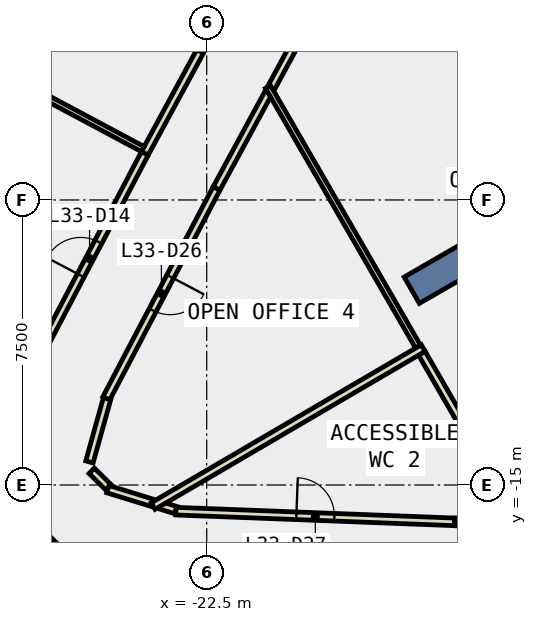
"""IFC4 building model, lengths in metres.
Left out: names, types, materials, properties, quantities, classifications, styles, units other than length and angle.
Written with IfcOpenShell. Run it as: python <this file> out.ifc"""

import sys

from ifc_helpers import new_model, si_unit, direction, frame, frame_2d, origin, place, context, subcontext, project, spatial, rectangle, extrude, element, fill, save


model = new_model("IFC4")
c1 = context("Model", 3, precision=1e-05, world=origin(), true_north=direction((0.0, 1.0)))
c2 = subcontext(c1, "Body", "Model", "MODEL_VIEW")
j1 = project(units=[si_unit("LENGTHUNIT", "METRE"), si_unit("PLANEANGLEUNIT", "RADIAN")], contexts=[c1])
p1 = place(None, origin())
s1 = spatial("IfcSite", under=j1, at=p1, CompositionType="ELEMENT")
p2 = place(p1, origin())
s2 = spatial("IfcBuilding", under=s1, at=p2, CompositionType="ELEMENT")
p3 = place(p2, frame((0.0, 0.0, 150.8)))
s3 = spatial("IfcBuildingStorey", under=s2, at=p3, CompositionType="ELEMENT", Elevation=150.8)
p4 = place(p3, frame((-9.31, -5.375, -0.4), z_axis=(0.0, 0.0, 1.0), x_axis=(-0.866017533419, -0.500013631625, 0.0)))
e1 = element("IfcWall", 1, at=p4, inside=s3, PredefinedType="SHEAR", context=c2, shape_type="SweptSolid", body=[
    extrude(rectangle(XDim=9.0, YDim=0.8, at=frame_2d((4.5, 0.0))), origin(), (0.0, 0.0, 1.0), 4.2),
])
p5 = place(p3, frame((-18.93, -1.095, 0.0), z_axis=(0.0, 0.0, 1.0), x_axis=(-0.476854303058, -0.878982351162, 0.0)))
e2 = element("IfcWall", 2, at=p5, inside=s3, PredefinedType="PARTITIONING", context=c2, shape_type="SweptSolid", body=[
    extrude(rectangle(XDim=3.924, YDim=0.2, at=frame_2d((1.962, 0.0))), origin(), (0.0, 0.0, 1.0), 3.8),
])
p6 = place(p3, frame((-20.873, -4.676, 0.0), z_axis=(0.0, 0.0, 1.0), x_axis=(-0.476781985736, -0.879021579984, 0.0)))
e3 = element("IfcWall", 3, at=p6, inside=s3, PredefinedType="PARTITIONING", context=c2, shape_type="SweptSolid", body=[
    extrude(rectangle(XDim=2.869, YDim=0.2, at=frame_2d((1.435, 0.0))), origin(), (0.0, 0.0, 1.0), 3.8),
])
p7 = place(p3, frame((-22.241, -7.198, 0.0), z_axis=(0.0, 0.0, 1.0), x_axis=(-0.465089990515, -0.885263407536, 0.0)))
e4 = element("IfcWall", 4, at=p7, inside=s3, PredefinedType="PARTITIONING", context=c2, shape_type="SweptSolid", body=[
    extrude(rectangle(XDim=6.24, YDim=0.2, at=frame_2d((3.12, 0.0))), origin(), (0.0, 0.0, 1.0), 3.8),
])
p8 = place(p7, frame((2.62, 0.0, 0.0)))
e5 = element("IfcOpeningElement", 5, at=p8, cuts=e4, PredefinedType="OPENING", context=c2, shape_type="SweptSolid", body=[
    extrude(rectangle(XDim=1.0, YDim=2.1, at=frame_2d((0.5, 1.05))), frame((0.0, 0.11, 0.0), z_axis=(0.0, -1.0, 0.0), x_axis=(1.0, 0.0, 0.0)), (0.0, 0.0, 1.0), 0.22),
])
p9 = place(p3, frame((-25.123, -12.73, 0.0), z_axis=(0.0, 0.0, 1.0), x_axis=(-0.268139825244, -0.963380005044, 0.0)))
e6 = element("IfcWall", 6, at=p9, inside=s3, PredefinedType="PARTITIONING", context=c2, shape_type="SweptSolid", body=[
    extrude(rectangle(XDim=1.726, YDim=0.2, at=frame_2d((0.863, 0.0))), origin(), (0.0, 0.0, 1.0), 3.8),
])
p10 = place(p3, frame((-25.526, -14.626, 0.0), z_axis=(0.0, 0.0, 1.0), x_axis=(0.711758647644, -0.702424108003, 0.0)))
e7 = element("IfcWall", 7, at=p10, inside=s3, PredefinedType="PARTITIONING", context=c2, shape_type="SweptSolid", body=[
    extrude(rectangle(XDim=0.628, YDim=0.2, at=frame_2d((0.314, 0.0))), origin(), (0.0, 0.0, 1.0), 3.8),
])
p11 = place(p3, frame((-25.103, -15.108, 0.0), z_axis=(0.0, 0.0, 1.0), x_axis=(0.955420813731, -0.295247470251, 0.0)))
e8 = element("IfcWall", 8, at=p11, inside=s3, PredefinedType="PARTITIONING", context=c2, shape_type="SweptSolid", body=[
    extrude(rectangle(XDim=1.24, YDim=0.2, at=frame_2d((0.62, 0.0))), origin(), (0.0, 0.0, 1.0), 3.8),
])
p12 = place(p3, frame((-23.727, -15.532, 0.0), z_axis=(0.0, 0.0, 1.0), x_axis=(0.955237350621, -0.295840504289, 0.0)))
e9 = element("IfcWall", 9, at=p12, inside=s3, PredefinedType="PARTITIONING", context=c2, shape_type="SweptSolid", body=[
    extrude(rectangle(XDim=0.44, YDim=0.2, at=frame_2d((0.22, 0.0))), origin(), (0.0, 0.0, 1.0), 3.8),
])
p13 = place(p3, frame((-23.311, -15.688, 0.0), z_axis=(0.0, 0.0, 1.0), x_axis=(0.999262695969, -0.038393546916, 0.0)))
e10 = element("IfcWall", 10, at=p13, inside=s3, PredefinedType="PARTITIONING", context=c2, shape_type="SweptSolid", body=[
    extrude(rectangle(XDim=7.344, YDim=0.2, at=frame_2d((3.672, 0.0))), origin(), (0.0, 0.0, 1.0), 3.8),
])
p14 = place(p13, frame((3.172, 0.0, 0.0)))
e11 = element("IfcOpeningElement", 11, at=p14, cuts=e10, PredefinedType="OPENING", context=c2, shape_type="SweptSolid", body=[
    extrude(rectangle(XDim=1.0, YDim=2.1, at=frame_2d((0.5, 1.05))), frame((0.0, 0.11, 0.0), z_axis=(0.0, -1.0, 0.0), x_axis=(1.0, 0.0, 0.0)), (0.0, 0.0, 1.0), 0.22),
])
p15 = place(p3, frame((-15.972, -15.97, 0.0), z_axis=(0.0, 0.0, 1.0), x_axis=(0.999750111735, -0.022354285623, 0.0)))
e12 = element("IfcWall", 12, at=p15, inside=s3, PredefinedType="PARTITIONING", context=c2, shape_type="SweptSolid", body=[
    extrude(rectangle(XDim=1.616, YDim=0.2, at=frame_2d((0.808, 0.0))), origin(), (0.0, 0.0, 1.0), 3.8),
])
p16 = place(p3, frame((-24.13, -6.275, 0.0), z_axis=(0.0, 0.0, 1.0), x_axis=(0.476981750532, 0.878913198023, 0.0)))
e13 = element("IfcWall", 13, at=p16, inside=s3, PredefinedType="PARTITIONING", context=c2, shape_type="SweptSolid", body=[
    extrude(rectangle(XDim=7.046, YDim=0.2, at=frame_2d((3.523, 0.0))), origin(), (0.0, 0.0, 1.0), 3.8),
])
p17 = place(p16, frame((3.023, 0.0, 0.0)))
e14 = element("IfcOpeningElement", 14, at=p17, cuts=e13, PredefinedType="OPENING", context=c2, shape_type="SweptSolid", body=[
    extrude(rectangle(XDim=1.0, YDim=2.1, at=frame_2d((0.5, 1.05))), frame((0.0, 0.11, 0.0), z_axis=(0.0, -1.0, 0.0), x_axis=(1.0, 0.0, 0.0)), (0.0, 0.0, 1.0), 0.22),
])
p18 = place(p3, frame((-27.106, -11.944, 0.0), z_axis=(0.0, 0.0, 1.0), x_axis=(0.464985599417, 0.885318243534, 0.0)))
e15 = element("IfcWall", 15, at=p18, inside=s3, PredefinedType="PARTITIONING", context=c2, shape_type="SweptSolid", body=[
    extrude(rectangle(XDim=6.402, YDim=0.2, at=frame_2d((3.201, 0.0))), origin(), (0.0, 0.0, 1.0), 3.8),
])
p19 = place(p18, frame((2.776, 0.0, 0.0)))
e16 = element("IfcOpeningElement", 16, at=p19, cuts=e15, PredefinedType="OPENING", context=c2, shape_type="SweptSolid", body=[
    extrude(rectangle(XDim=1.0, YDim=2.1, at=frame_2d((0.5, 1.05))), frame((0.0, 0.11, 0.0), z_axis=(0.0, -1.0, 0.0), x_axis=(1.0, 0.0, 0.0)), (0.0, 0.0, 1.0), 0.22),
])
p20 = place(p3, frame((-26.188, -16.922, 0.0), z_axis=(0.0, 0.0, 1.0), x_axis=(-0.712339678389, 0.701834868465, 0.0)))
e17 = element("IfcWall", 17, at=p20, inside=s3, PredefinedType="PARTITIONING", context=c2, shape_type="SweptSolid", body=[
    extrude(rectangle(XDim=1.72, YDim=0.2, at=frame_2d((0.86, 0.0))), origin(), (0.0, 0.0, 1.0), 3.8),
])
p21 = place(p3, frame((-16.939, -11.36, 0.0), z_axis=(0.0, 0.0, 1.0), x_axis=(-0.500053473428, 0.865994528685, 0.0)))
e18 = element("IfcWall", 18, at=p21, inside=s3, PredefinedType="PARTITIONING", context=c2, shape_type="SweptSolid", body=[
    extrude(rectangle(XDim=7.895, YDim=0.15, at=frame_2d((3.948, 0.0))), origin(), (0.0, 0.0, 1.0), 3.8),
])
p22 = place(p3, frame((-15.18, -14.408, 0.0), z_axis=(0.0, 0.0, 1.0), x_axis=(-0.499968694491, 0.866043477274, 0.0)))
e19 = element("IfcWall", 19, at=p22, inside=s3, PredefinedType="PARTITIONING", context=c2, shape_type="SweptSolid", body=[
    extrude(rectangle(XDim=3.319, YDim=0.2, at=frame_2d((1.659, 0.0))), origin(), (0.0, 0.0, 1.0), 3.8),
])
p23 = place(p3, frame((-16.803, -11.397, 0.0), z_axis=(0.0, 0.0, 1.0), x_axis=(-0.863203941699, -0.504855380318, 0.0)))
e20 = element("IfcWall", 20, at=p23, inside=s3, PredefinedType="PARTITIONING", context=c2, shape_type="SweptSolid", body=[
    extrude(rectangle(XDim=8.232, YDim=0.2, at=frame_2d((4.116, 0.0))), origin(), (0.0, 0.0, 1.0), 3.8),
])
p24 = place(p3, frame((-24.182, -6.162, 0.0), z_axis=(0.0, 0.0, 1.0), x_axis=(-0.88214427755, 0.470979270866, 0.0)))
e21 = element("IfcWall", 21, at=p24, inside=s3, PredefinedType="PARTITIONING", context=c2, shape_type="SweptSolid", body=[
    extrude(rectangle(XDim=4.731, YDim=0.15, at=frame_2d((2.365, 0.0))), origin(), (0.0, 0.0, 1.0), 3.8),
])
p25 = place(p17, origin())
e22 = element("IfcDoor", 22, at=p25, inside=s3, OperationType="SINGLE_SWING_RIGHT", PredefinedType="DOOR", context=c2, shape_type="SweptSolid", body=[
    extrude(rectangle(XDim=1.0, YDim=2.1, at=frame_2d((0.5, 1.05))), frame((0.0, 0.025, 0.0), z_axis=(0.0, -1.0, 0.0), x_axis=(1.0, 0.0, 0.0)), (0.0, 0.0, 1.0), 0.05),
])
fill(e14, e22)
p26 = place(p19, origin())
e23 = element("IfcDoor", 23, at=p26, inside=s3, OperationType="SINGLE_SWING_LEFT", PredefinedType="DOOR", context=c2, shape_type="SweptSolid", body=[
    extrude(rectangle(XDim=1.0, YDim=2.1, at=frame_2d((0.5, 1.05))), frame((0.0, 0.025, 0.0), z_axis=(0.0, -1.0, 0.0), x_axis=(1.0, 0.0, 0.0)), (0.0, 0.0, 1.0), 0.05),
])
fill(e16, e23)
p27 = place(p8, origin())
e24 = element("IfcDoor", 24, at=p27, inside=s3, OperationType="SINGLE_SWING_LEFT", PredefinedType="DOOR", context=c2, shape_type="SweptSolid", body=[
    extrude(rectangle(XDim=1.0, YDim=2.1, at=frame_2d((0.5, 1.05))), frame((0.0, 0.025, 0.0), z_axis=(0.0, -1.0, 0.0), x_axis=(1.0, 0.0, 0.0)), (0.0, 0.0, 1.0), 0.05),
])
fill(e5, e24)
p28 = place(p14, origin())
e25 = element("IfcDoor", 25, at=p28, inside=s3, OperationType="SINGLE_SWING_RIGHT", PredefinedType="DOOR", context=c2, shape_type="SweptSolid", body=[
    extrude(rectangle(XDim=1.0, YDim=2.1, at=frame_2d((0.5, 1.05))), frame((0.0, 0.025, 0.0), z_axis=(0.0, -1.0, 0.0), x_axis=(1.0, 0.0, 0.0)), (0.0, 0.0, 1.0), 0.05),
])
fill(e11, e25)
save(model, sys.argv[1])
